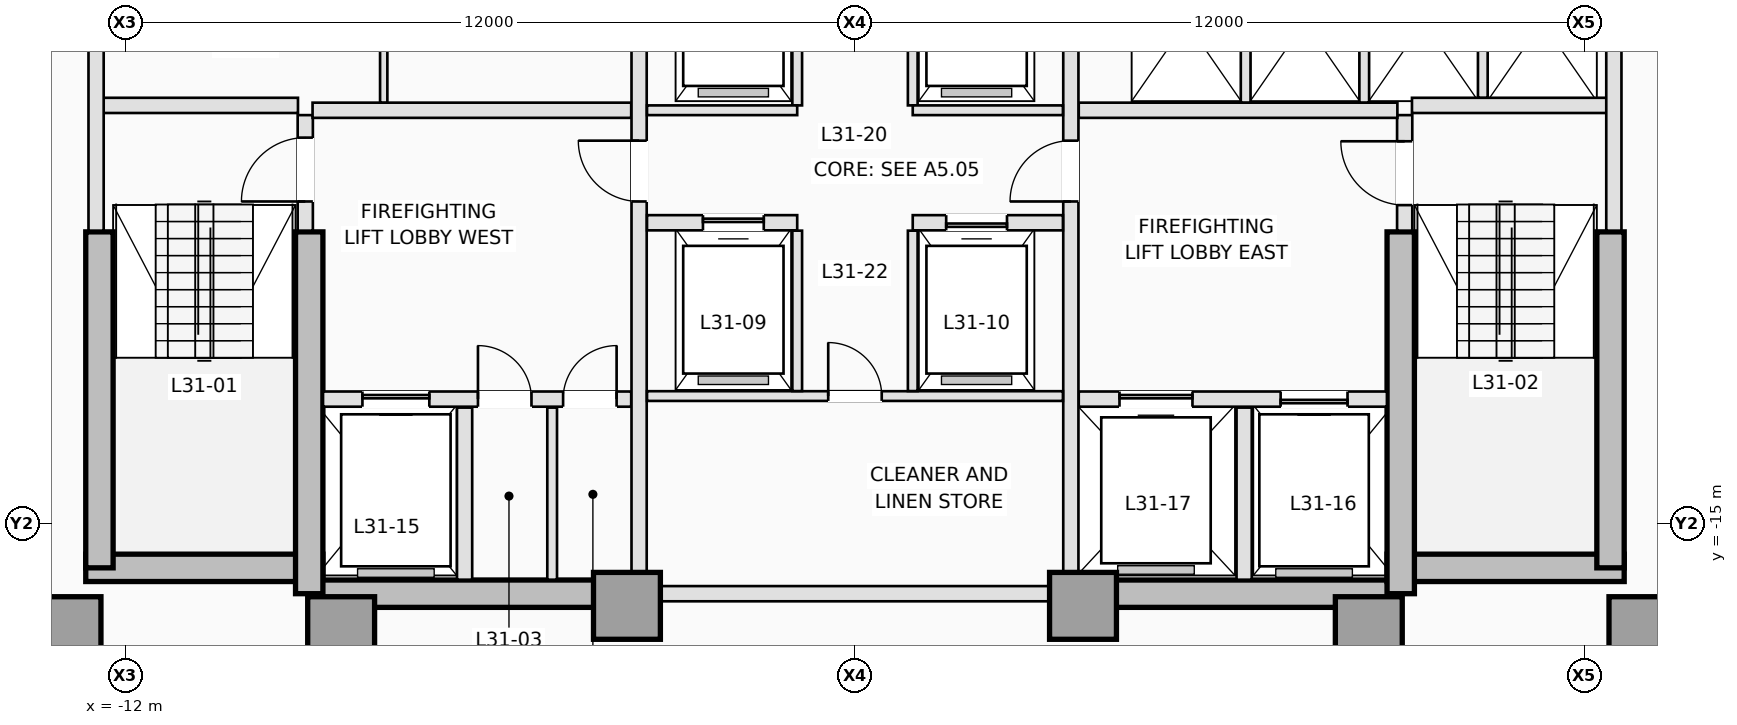
"""IFC4 building model, lengths in metres.
Left out: names, types, materials, properties, quantities, classifications, styles, units other than length and angle.
Written with IfcOpenShell. Run it as: python <this file> out.ifc"""

import sys

from ifc_helpers import new_model, si_unit, direction, frame, frame_2d, origin, origin_2d, place, context, subcontext, project, spatial, rectangle, extrude, element, fill, save


model = new_model("IFC4")
c1 = context("Model", 3, precision=1e-05, world=origin(), true_north=direction((0.0, 1.0)))
c2 = subcontext(c1, "Body", "Model", "MODEL_VIEW")
j1 = project(units=[si_unit("LENGTHUNIT", "METRE"), si_unit("PLANEANGLEUNIT", "RADIAN")], contexts=[c1])
p1 = place(None, origin())
s1 = spatial("IfcSite", under=j1, at=p1, CompositionType="ELEMENT")
p2 = place(p1, origin())
s2 = spatial("IfcBuilding", under=s1, at=p2, CompositionType="ELEMENT")
p3 = place(p2, frame((0.0, 0.0, 116.0)))
s3 = spatial("IfcBuildingStorey", under=s2, at=p3, CompositionType="ELEMENT", Elevation=116.0)
p4 = place(p3, frame((-12.65, -15.725, 0.0), z_axis=(0.0, 0.0, 1.0), x_axis=(1.0, 0.0, 0.0)))
e1 = element("IfcWall", 1, at=p4, inside=s3, PredefinedType="SHEAR", context=c2, shape_type="SweptSolid", body=[
    extrude(rectangle(XDim=3.9, YDim=0.45, at=frame_2d((1.95, 0.0))), origin(), (0.0, 0.0, 1.0), 3.5),
])
for number, where, z_axis, x_axis in (
    (2, (-8.975, -16.15, 0.0), (0.0, 0.0, 1.0), (1.0, 0.0, 0.0)),
    (3, (3.75, -16.15, 0.0), (0.0, 0.0, 1.0), (1.0, 0.0, 0.0)),
):
    element("IfcWall", number, at=place(p3, frame(where, z_axis=z_axis, x_axis=x_axis)), inside=s3, PredefinedType="SHEAR", context=c2, shape_type="SweptSolid", body=[
        extrude(rectangle(XDim=5.225, YDim=0.45, at=frame_2d((2.613, 0.0))), origin(), (0.0, 0.0, 1.0), 3.5),
    ])
p5 = place(p3, frame((8.75, -15.725, 0.0), z_axis=(0.0, 0.0, 1.0), x_axis=(1.0, 0.0, 0.0)))
e4 = element("IfcWall", 4, at=p5, inside=s3, PredefinedType="SHEAR", context=c2, shape_type="SweptSolid", body=[
    extrude(rectangle(XDim=3.9, YDim=0.45, at=frame_2d((1.95, 0.0))), origin(), (0.0, 0.0, 1.0), 3.5),
])
for number, where, z_axis, x_axis in (
    (5, (-12.425, -15.725, 0.0), (0.0, 0.0, 1.0), (0.0, 1.0, 0.0)),
    (6, (12.425, -15.725, 0.0), (0.0, 0.0, 1.0), (0.0, 1.0, 0.0)),
):
    element("IfcWall", number, at=place(p3, frame(where, z_axis=z_axis, x_axis=x_axis)), inside=s3, PredefinedType="SHEAR", context=c2, shape_type="SweptSolid", body=[
        extrude(rectangle(XDim=5.525, YDim=0.45, at=frame_2d((2.763, 0.0))), origin(), (0.0, 0.0, 1.0), 3.5),
    ])
for number, where, z_axis, x_axis in (
    (7, (-8.975, -16.15, 0.0), (0.0, 0.0, 1.0), (0.0, 1.0, 0.0)),
    (8, (8.975, -16.15, 0.0), (0.0, 0.0, 1.0), (0.0, 1.0, 0.0)),
):
    element("IfcWall", number, at=place(p3, frame(where, z_axis=z_axis, x_axis=x_axis)), inside=s3, PredefinedType="SHEAR", context=c2, shape_type="SweptSolid", body=[
        extrude(rectangle(XDim=5.95, YDim=0.45, at=frame_2d((2.975, 0.0))), origin(), (0.0, 0.0, 1.0), 3.5),
    ])
for number, where, z_axis, x_axis in (
    (9, (-12.95, -16.75, 0.0), (0.0, 0.0, 1.0), (1.0, 0.0, 0.0)),
    (10, (-8.45, -16.75, 0.0), (0.0, 0.0, 1.0), (1.0, 0.0, 0.0)),
    (11, (-3.75, -16.35, 0.0), (0.0, 0.0, 1.0), (1.0, 0.0, 0.0)),
    (12, (3.75, -16.35, 0.0), (0.0, 0.0, 1.0), (1.0, 0.0, 0.0)),
    (13, (8.45, -16.75, 0.0), (0.0, 0.0, 1.0), (1.0, 0.0, 0.0)),
    (14, (12.95, -16.75, 0.0), (0.0, 0.0, 1.0), (1.0, 0.0, 0.0)),
):
    element("IfcColumn", number, at=place(p3, frame(where, z_axis=z_axis, x_axis=x_axis)), inside=s3, PredefinedType="COLUMN", context=c2, shape_type="SweptSolid", body=[
        extrude(rectangle(XDim=1.1, YDim=1.1, at=origin_2d()), origin(), (0.0, 0.0, 1.0), 3.5),
    ])
p6 = place(p3, frame((-9.04, -10.18, 0.0), z_axis=(0.0, 0.0, 1.0), x_axis=(0.0, 1.0, 0.0)))
e15 = element("IfcWall", 15, at=p6, inside=s3, PredefinedType="PARTITIONING", context=c2, shape_type="SweptSolid", body=[
    extrude(rectangle(XDim=1.9, YDim=0.25, at=frame_2d((0.95, 0.0))), origin(), (0.0, 0.0, 1.0), 3.25),
])
p7 = place(p6, frame((0.48, 0.0, 0.0)))
e16 = element("IfcOpeningElement", 16, at=p7, cuts=e15, PredefinedType="OPENING", context=c2, shape_type="SweptSolid", body=[
    extrude(rectangle(XDim=1.05, YDim=2.15, at=frame_2d((0.525, 1.075))), frame((0.0, 0.135, 0.0), z_axis=(0.0, -1.0, 0.0), x_axis=(1.0, 0.0, 0.0)), (0.0, 0.0, 1.0), 0.27),
])
p8 = place(p3, frame((9.04, -10.18, 0.0), z_axis=(0.0, 0.0, 1.0), x_axis=(0.0, 1.0, 0.0)))
e17 = element("IfcWall", 17, at=p8, inside=s3, PredefinedType="PARTITIONING", context=c2, shape_type="SweptSolid", body=[
    extrude(rectangle(XDim=1.9, YDim=0.25, at=frame_2d((0.95, 0.0))), origin(), (0.0, 0.0, 1.0), 3.25),
])
p9 = place(p8, frame((0.42, 0.0, 0.0)))
e18 = element("IfcOpeningElement", 18, at=p9, cuts=e17, PredefinedType="OPENING", context=c2, shape_type="SweptSolid", body=[
    extrude(rectangle(XDim=1.05, YDim=2.15, at=frame_2d((0.525, 1.075))), frame((0.0, 0.135, 0.0), z_axis=(0.0, -1.0, 0.0), x_axis=(1.0, 0.0, 0.0)), (0.0, 0.0, 1.0), 0.27),
])
for number, where, z_axis, x_axis in (
    (19, (-12.38, -8.12, 0.0), (0.0, 0.0, 1.0), (1.0, 0.0, 0.0)),
    (20, (9.16, -8.12, 0.0), (0.0, 0.0, 1.0), (1.0, 0.0, 0.0)),
):
    element("IfcWall", number, at=place(p3, frame(where, z_axis=z_axis, x_axis=x_axis)), inside=s3, PredefinedType="PARTITIONING", context=c2, shape_type="SweptSolid", body=[
        extrude(rectangle(XDim=3.22, YDim=0.25, at=frame_2d((1.61, 0.0))), origin(), (0.0, 0.0, 1.0), 3.25),
    ])
for number, where, z_axis, x_axis in (
    (21, (-12.48, -10.18, 0.0), (0.0, 0.0, 1.0), (0.0, 1.0, 0.0)),
    (22, (12.48, -10.18, 0.0), (0.0, 0.0, 1.0), (0.0, 1.0, 0.0)),
):
    element("IfcWall", number, at=place(p3, frame(where, z_axis=z_axis, x_axis=x_axis)), inside=s3, PredefinedType="PARTITIONING", context=c2, shape_type="SweptSolid", body=[
        extrude(rectangle(XDim=4.828, YDim=0.25, at=frame_2d((2.414, 0.0))), origin(), (0.0, 0.0, 1.0), 3.25),
    ])
p10 = place(p3, frame((-8.748, -12.95, 0.0), z_axis=(0.0, 0.0, 1.0), x_axis=(1.0, 0.0, 0.0)))
e23 = element("IfcWall", 23, at=p10, inside=s3, PredefinedType="PARTITIONING", context=c2, shape_type="SweptSolid", body=[
    extrude(rectangle(XDim=5.068, YDim=0.25, at=frame_2d((2.534, 0.0))), origin(), (0.0, 0.0, 1.0), 3.25),
])
p11 = place(p10, frame((0.648, 0.0, 0.0)))
e24 = element("IfcOpeningElement", 24, at=p11, cuts=e23, PredefinedType="OPENING", context=c2, shape_type="SweptSolid", body=[
    extrude(rectangle(XDim=1.1, YDim=2.15, at=frame_2d((0.55, 1.075))), frame((0.0, 0.135, 0.0), z_axis=(0.0, -1.0, 0.0), x_axis=(1.0, 0.0, 0.0)), (0.0, 0.0, 1.0), 0.27),
])
p12 = place(p10, frame((2.548, 0.0, 0.0)))
e25 = element("IfcOpeningElement", 25, at=p12, cuts=e23, PredefinedType="OPENING", context=c2, shape_type="SweptSolid", body=[
    extrude(rectangle(XDim=0.88, YDim=2.1, at=frame_2d((0.44, 1.05))), frame((0.0, 0.135, 0.0), z_axis=(0.0, -1.0, 0.0), x_axis=(1.0, 0.0, 0.0)), (0.0, 0.0, 1.0), 0.27),
])
p13 = place(p10, frame((3.948, 0.0, 0.0)))
e26 = element("IfcOpeningElement", 26, at=p13, cuts=e23, PredefinedType="OPENING", context=c2, shape_type="SweptSolid", body=[
    extrude(rectangle(XDim=0.88, YDim=2.1, at=frame_2d((0.44, 1.05))), frame((0.0, 0.135, 0.0), z_axis=(0.0, -1.0, 0.0), x_axis=(1.0, 0.0, 0.0)), (0.0, 0.0, 1.0), 0.27),
])
p14 = place(p3, frame((3.68, -12.95, 0.0), z_axis=(0.0, 0.0, 1.0), x_axis=(1.0, 0.0, 0.0)))
e27 = element("IfcWall", 27, at=p14, inside=s3, PredefinedType="PARTITIONING", context=c2, shape_type="SweptSolid", body=[
    extrude(rectangle(XDim=5.068, YDim=0.25, at=frame_2d((2.534, 0.0))), origin(), (0.0, 0.0, 1.0), 3.25),
])
p15 = place(p14, frame((3.32, 0.0, 0.0)))
e28 = element("IfcOpeningElement", 28, at=p15, cuts=e27, PredefinedType="OPENING", context=c2, shape_type="SweptSolid", body=[
    extrude(rectangle(XDim=1.1, YDim=2.15, at=frame_2d((0.55, 1.075))), frame((0.0, 0.135, 0.0), z_axis=(0.0, -1.0, 0.0), x_axis=(1.0, 0.0, 0.0)), (0.0, 0.0, 1.0), 0.27),
])
p16 = place(p14, frame((0.67, 0.0, 0.0)))
e29 = element("IfcOpeningElement", 29, at=p16, cuts=e27, PredefinedType="OPENING", context=c2, shape_type="SweptSolid", body=[
    extrude(rectangle(XDim=1.2, YDim=2.15, at=frame_2d((0.6, 1.075))), frame((0.0, 0.135, 0.0), z_axis=(0.0, -1.0, 0.0), x_axis=(1.0, 0.0, 0.0)), (0.0, 0.0, 1.0), 0.27),
])
p17 = place(p3, frame((-6.42, -15.92, 0.0), z_axis=(0.0, 0.0, 1.0), x_axis=(0.0, 1.0, 0.0)))
e30 = element("IfcWall", 30, at=p17, inside=s3, PredefinedType="PARTITIONING", context=c2, shape_type="SweptSolid", body=[
    extrude(rectangle(XDim=2.83, YDim=0.25, at=frame_2d((1.415, 0.0))), origin(), (0.0, 0.0, 1.0), 3.25),
])
p18 = place(p3, frame((-4.98, -15.92, 0.0), z_axis=(0.0, 0.0, 1.0), x_axis=(0.0, 1.0, 0.0)))
e31 = element("IfcWall", 31, at=p18, inside=s3, PredefinedType="PARTITIONING", context=c2, shape_type="SweptSolid", body=[
    extrude(rectangle(XDim=2.83, YDim=0.16, at=frame_2d((1.415, 0.0))), origin(), (0.0, 0.0, 1.0), 3.25),
])
p19 = place(p3, frame((6.4, -15.92, 0.0), z_axis=(0.0, 0.0, 1.0), x_axis=(0.0, 1.0, 0.0)))
e32 = element("IfcWall", 32, at=p19, inside=s3, PredefinedType="PARTITIONING", context=c2, shape_type="SweptSolid", body=[
    extrude(rectangle(XDim=2.83, YDim=0.25, at=frame_2d((1.415, 0.0))), origin(), (0.0, 0.0, 1.0), 3.25),
])
for number, where, z_axis, x_axis in (
    (33, (-8.92, -8.2, 0.0), (0.0, 0.0, 1.0), (1.0, 0.0, 0.0)),
    (34, (3.68, -8.2, 0.0), (0.0, 0.0, 1.0), (1.0, 0.0, 0.0)),
):
    element("IfcWall", number, at=place(p3, frame(where, z_axis=z_axis, x_axis=x_axis)), inside=s3, PredefinedType="PARTITIONING", context=c2, shape_type="SweptSolid", body=[
        extrude(rectangle(XDim=5.24, YDim=0.25, at=frame_2d((2.62, 0.0))), origin(), (0.0, 0.0, 1.0), 3.25),
    ])
p20 = place(p3, frame((-3.55, -15.798, 0.0), z_axis=(0.0, 0.0, 1.0), x_axis=(0.0, 1.0, 0.0)))
e35 = element("IfcWall", 35, at=p20, inside=s3, PredefinedType="PARTITIONING", context=c2, shape_type="SweptSolid", body=[
    extrude(rectangle(XDim=10.446, YDim=0.25, at=frame_2d((5.223, 0.0))), origin(), (0.0, 0.0, 1.0), 3.25),
])
p21 = place(p20, frame((6.098, 0.0, 0.0)))
e36 = element("IfcOpeningElement", 36, at=p21, cuts=e35, PredefinedType="OPENING", context=c2, shape_type="SweptSolid", body=[
    extrude(rectangle(XDim=1.0, YDim=2.15, at=frame_2d((0.5, 1.075))), frame((0.0, 0.135, 0.0), z_axis=(0.0, -1.0, 0.0), x_axis=(1.0, 0.0, 0.0)), (0.0, 0.0, 1.0), 0.27),
])
p22 = place(p3, frame((3.55, -15.798, 0.0), z_axis=(0.0, 0.0, 1.0), x_axis=(0.0, 1.0, 0.0)))
e37 = element("IfcWall", 37, at=p22, inside=s3, PredefinedType="PARTITIONING", context=c2, shape_type="SweptSolid", body=[
    extrude(rectangle(XDim=10.446, YDim=0.25, at=frame_2d((5.223, 0.0))), origin(), (0.0, 0.0, 1.0), 3.25),
])
p23 = place(p22, frame((6.098, 0.0, 0.0)))
e38 = element("IfcOpeningElement", 38, at=p23, cuts=e37, PredefinedType="OPENING", context=c2, shape_type="SweptSolid", body=[
    extrude(rectangle(XDim=1.0, YDim=2.15, at=frame_2d((0.5, 1.075))), frame((0.0, 0.135, 0.0), z_axis=(0.0, -1.0, 0.0), x_axis=(1.0, 0.0, 0.0)), (0.0, 0.0, 1.0), 0.27),
])
p24 = place(p3, frame((-7.75, -8.073, 0.0), z_axis=(0.0, 0.0, 1.0), x_axis=(0.0, 1.0, 0.0)))
e39 = element("IfcWall", 39, at=p24, inside=s3, PredefinedType="PARTITIONING", context=c2, shape_type="SweptSolid", body=[
    extrude(rectangle(XDim=2.733, YDim=0.12, at=frame_2d((1.366, 0.0))), origin(), (0.0, 0.0, 1.0), 3.25),
])
for number, where, z_axis, x_axis in (
    (40, (6.425, -8.073, 0.0), (0.0, 0.0, 1.0), (0.0, 1.0, 0.0)),
    (41, (8.375, -8.073, 0.0), (0.0, 0.0, 1.0), (0.0, 1.0, 0.0)),
):
    element("IfcWall", number, at=place(p3, frame(where, z_axis=z_axis, x_axis=x_axis)), inside=s3, PredefinedType="PARTITIONING", context=c2, shape_type="SweptSolid", body=[
        extrude(rectangle(XDim=2.733, YDim=0.16, at=frame_2d((1.366, 0.0))), origin(), (0.0, 0.0, 1.0), 3.25),
    ])
p25 = place(p3, frame((10.325, -7.993, 0.0), z_axis=(0.0, 0.0, 1.0), x_axis=(0.0, 1.0, 0.0)))
e42 = element("IfcWall", 42, at=p25, inside=s3, PredefinedType="PARTITIONING", context=c2, shape_type="SweptSolid", body=[
    extrude(rectangle(XDim=2.653, YDim=0.16, at=frame_2d((1.326, 0.0))), origin(), (0.0, 0.0, 1.0), 3.25),
])
p26 = place(p3, frame((-3.198, -16.15, 0.0), z_axis=(0.0, 0.0, 1.0), x_axis=(1.0, 0.0, 0.0)))
e43 = element("IfcWall", 43, at=p26, inside=s3, PredefinedType="PARTITIONING", context=c2, shape_type="SweptSolid", body=[
    extrude(rectangle(XDim=6.396, YDim=0.25, at=frame_2d((3.198, 0.0))), origin(), (0.0, 0.0, 1.0), 2.3),
])
for number, where, z_axis, x_axis in (
    (44, (-0.95, -8.12, 0.0), (0.0, 0.0, 1.0), (0.0, 1.0, 0.0)),
    (45, (0.95, -8.12, 0.0), (0.0, 0.0, 1.0), (0.0, 1.0, 0.0)),
):
    element("IfcWall", number, at=place(p3, frame(where, z_axis=z_axis, x_axis=x_axis)), inside=s3, PredefinedType="PARTITIONING", context=c2, shape_type="SweptSolid", body=[
        extrude(rectangle(XDim=2.78, YDim=0.16, at=frame_2d((1.39, 0.0))), origin(), (0.0, 0.0, 1.0), 3.25),
    ])
for number, where, z_axis, x_axis in (
    (46, (-3.42, -8.2, 0.0), (0.0, 0.0, 1.0), (1.0, 0.0, 0.0)),
    (47, (0.95, -8.2, 0.0), (0.0, 0.0, 1.0), (1.0, 0.0, 0.0)),
):
    element("IfcWall", number, at=place(p3, frame(where, z_axis=z_axis, x_axis=x_axis)), inside=s3, PredefinedType="PARTITIONING", context=c2, shape_type="SweptSolid", body=[
        extrude(rectangle(XDim=2.47, YDim=0.16, at=frame_2d((1.235, 0.0))), origin(), (0.0, 0.0, 1.0), 3.25),
    ])
p27 = place(p3, frame((-3.42, -10.05, 0.0), z_axis=(0.0, 0.0, 1.0), x_axis=(1.0, 0.0, 0.0)))
e48 = element("IfcWall", 48, at=p27, inside=s3, PredefinedType="PARTITIONING", context=c2, shape_type="SweptSolid", body=[
    extrude(rectangle(XDim=2.47, YDim=0.25, at=frame_2d((1.235, 0.0))), origin(), (0.0, 0.0, 1.0), 3.25),
])
p28 = place(p27, frame((0.92, 0.0, 0.0)))
e49 = element("IfcOpeningElement", 49, at=p28, cuts=e48, PredefinedType="OPENING", context=c2, shape_type="SweptSolid", body=[
    extrude(rectangle(XDim=1.0, YDim=2.15, at=frame_2d((0.5, 1.075))), frame((0.0, 0.135, 0.0), z_axis=(0.0, -1.0, 0.0), x_axis=(1.0, 0.0, 0.0)), (0.0, 0.0, 1.0), 0.27),
])
p29 = place(p3, frame((0.95, -10.05, 0.0), z_axis=(0.0, 0.0, 1.0), x_axis=(1.0, 0.0, 0.0)))
e50 = element("IfcWall", 50, at=p29, inside=s3, PredefinedType="PARTITIONING", context=c2, shape_type="SweptSolid", body=[
    extrude(rectangle(XDim=2.47, YDim=0.25, at=frame_2d((1.235, 0.0))), origin(), (0.0, 0.0, 1.0), 3.25),
])
p30 = place(p29, frame((0.55, 0.0, 0.0)))
e51 = element("IfcOpeningElement", 51, at=p30, cuts=e50, PredefinedType="OPENING", context=c2, shape_type="SweptSolid", body=[
    extrude(rectangle(XDim=1.0, YDim=2.15, at=frame_2d((0.5, 1.075))), frame((0.0, 0.135, 0.0), z_axis=(0.0, -1.0, 0.0), x_axis=(1.0, 0.0, 0.0)), (0.0, 0.0, 1.0), 0.27),
])
p31 = place(p3, frame((-3.42, -12.9, 0.0), z_axis=(0.0, 0.0, 1.0), x_axis=(1.0, 0.0, 0.0)))
e52 = element("IfcWall", 52, at=p31, inside=s3, PredefinedType="PARTITIONING", context=c2, shape_type="SweptSolid", body=[
    extrude(rectangle(XDim=6.84, YDim=0.16, at=frame_2d((3.42, 0.0))), origin(), (0.0, 0.0, 1.0), 3.25),
])
p32 = place(p31, frame((2.98, 0.0, 0.0)))
e53 = element("IfcOpeningElement", 53, at=p32, cuts=e52, PredefinedType="OPENING", context=c2, shape_type="SweptSolid", body=[
    extrude(rectangle(XDim=0.88, YDim=2.12, at=frame_2d((0.44, 1.06))), frame((0.0, 0.09, 0.0), z_axis=(0.0, -1.0, 0.0), x_axis=(1.0, 0.0, 0.0)), (0.0, 0.0, 1.0), 0.18),
])
for number, where, z_axis, x_axis in (
    (54, (-0.95, -12.818, 0.0), (0.0, 0.0, 1.0), (0.0, 1.0, 0.0)),
    (55, (0.95, -12.818, 0.0), (0.0, 0.0, 1.0), (0.0, 1.0, 0.0)),
):
    element("IfcWall", number, at=place(p3, frame(where, z_axis=z_axis, x_axis=x_axis)), inside=s3, PredefinedType="PARTITIONING", context=c2, shape_type="SweptSolid", body=[
        extrude(rectangle(XDim=2.638, YDim=0.16, at=frame_2d((1.319, 0.0))), origin(), (0.0, 0.0, 1.0), 3.25),
    ])
p33 = place(p11, origin())
e56 = element("IfcDoor", 56, at=p33, inside=s3, OperationType="SLIDING_TO_LEFT", PredefinedType="DOOR", context=c2, shape_type="SweptSolid", body=[
    extrude(rectangle(XDim=1.1, YDim=2.15, at=frame_2d((0.55, 1.075))), frame((0.0, 0.025, 0.0), z_axis=(0.0, -1.0, 0.0), x_axis=(1.0, 0.0, 0.0)), (0.0, 0.0, 1.0), 0.05),
])
fill(e24, e56)
p34 = place(p15, origin())
e57 = element("IfcDoor", 57, at=p34, inside=s3, OperationType="SLIDING_TO_RIGHT", PredefinedType="DOOR", context=c2, shape_type="SweptSolid", body=[
    extrude(rectangle(XDim=1.1, YDim=2.15, at=frame_2d((0.55, 1.075))), frame((0.0, 0.025, 0.0), z_axis=(0.0, -1.0, 0.0), x_axis=(1.0, 0.0, 0.0)), (0.0, 0.0, 1.0), 0.05),
])
fill(e28, e57)
p35 = place(p16, origin())
e58 = element("IfcDoor", 58, at=p35, inside=s3, OperationType="SLIDING_TO_LEFT", PredefinedType="DOOR", context=c2, shape_type="SweptSolid", body=[
    extrude(rectangle(XDim=1.2, YDim=2.15, at=frame_2d((0.6, 1.075))), frame((0.0, 0.025, 0.0), z_axis=(0.0, -1.0, 0.0), x_axis=(1.0, 0.0, 0.0)), (0.0, 0.0, 1.0), 0.05),
])
fill(e29, e58)
p36 = place(p28, origin())
e59 = element("IfcDoor", 59, at=p36, inside=s3, OperationType="SLIDING_TO_LEFT", PredefinedType="DOOR", context=c2, shape_type="SweptSolid", body=[
    extrude(rectangle(XDim=1.0, YDim=2.15, at=frame_2d((0.5, 1.075))), frame((0.0, 0.025, 0.0), z_axis=(0.0, -1.0, 0.0), x_axis=(1.0, 0.0, 0.0)), (0.0, 0.0, 1.0), 0.05),
])
fill(e49, e59)
p37 = place(p30, origin())
e60 = element("IfcDoor", 60, at=p37, inside=s3, OperationType="SLIDING_TO_RIGHT", PredefinedType="DOOR", context=c2, shape_type="SweptSolid", body=[
    extrude(rectangle(XDim=1.0, YDim=2.15, at=frame_2d((0.5, 1.075))), frame((0.0, 0.025, 0.0), z_axis=(0.0, -1.0, 0.0), x_axis=(1.0, 0.0, 0.0)), (0.0, 0.0, 1.0), 0.05),
])
fill(e51, e60)
p38 = place(p7, origin())
e61 = element("IfcDoor", 61, at=p38, inside=s3, OperationType="SINGLE_SWING_LEFT", PredefinedType="DOOR", context=c2, shape_type="SweptSolid", body=[
    extrude(rectangle(XDim=1.05, YDim=2.15, at=frame_2d((0.525, 1.075))), frame((0.0, 0.025, 0.0), z_axis=(0.0, -1.0, 0.0), x_axis=(1.0, 0.0, 0.0)), (0.0, 0.0, 1.0), 0.05),
])
fill(e16, e61)
p39 = place(p9, origin())
e62 = element("IfcDoor", 62, at=p39, inside=s3, OperationType="SINGLE_SWING_RIGHT", PredefinedType="DOOR", context=c2, shape_type="SweptSolid", body=[
    extrude(rectangle(XDim=1.05, YDim=2.15, at=frame_2d((0.525, 1.075))), frame((0.0, 0.025, 0.0), z_axis=(0.0, -1.0, 0.0), x_axis=(1.0, 0.0, 0.0)), (0.0, 0.0, 1.0), 0.05),
])
fill(e18, e62)
p40 = place(p12, origin())
e63 = element("IfcDoor", 63, at=p40, inside=s3, OperationType="SINGLE_SWING_LEFT", PredefinedType="TRAPDOOR", context=c2, shape_type="SweptSolid", body=[
    extrude(rectangle(XDim=0.88, YDim=2.1, at=frame_2d((0.44, 1.05))), frame((0.0, 0.025, 0.0), z_axis=(0.0, -1.0, 0.0), x_axis=(1.0, 0.0, 0.0)), (0.0, 0.0, 1.0), 0.05),
])
fill(e25, e63)
p41 = place(p13, origin())
e64 = element("IfcDoor", 64, at=p41, inside=s3, OperationType="SINGLE_SWING_RIGHT", PredefinedType="TRAPDOOR", context=c2, shape_type="SweptSolid", body=[
    extrude(rectangle(XDim=0.88, YDim=2.1, at=frame_2d((0.44, 1.05))), frame((0.0, 0.025, 0.0), z_axis=(0.0, -1.0, 0.0), x_axis=(1.0, 0.0, 0.0)), (0.0, 0.0, 1.0), 0.05),
])
fill(e26, e64)
p42 = place(p21, origin())
e65 = element("IfcDoor", 65, at=p42, inside=s3, OperationType="SINGLE_SWING_RIGHT", PredefinedType="DOOR", context=c2, shape_type="SweptSolid", body=[
    extrude(rectangle(XDim=1.0, YDim=2.15, at=frame_2d((0.5, 1.075))), frame((0.0, 0.025, 0.0), z_axis=(0.0, -1.0, 0.0), x_axis=(1.0, 0.0, 0.0)), (0.0, 0.0, 1.0), 0.05),
])
fill(e36, e65)
p43 = place(p23, origin())
e66 = element("IfcDoor", 66, at=p43, inside=s3, OperationType="SINGLE_SWING_LEFT", PredefinedType="DOOR", context=c2, shape_type="SweptSolid", body=[
    extrude(rectangle(XDim=1.0, YDim=2.15, at=frame_2d((0.5, 1.075))), frame((0.0, 0.025, 0.0), z_axis=(0.0, -1.0, 0.0), x_axis=(1.0, 0.0, 0.0)), (0.0, 0.0, 1.0), 0.05),
])
fill(e38, e66)
p44 = place(p32, origin())
e67 = element("IfcDoor", 67, at=p44, inside=s3, OperationType="SINGLE_SWING_LEFT", PredefinedType="DOOR", context=c2, shape_type="SweptSolid", body=[
    extrude(rectangle(XDim=0.88, YDim=2.12, at=frame_2d((0.44, 1.06))), frame((0.0, 0.025, 0.0), z_axis=(0.0, -1.0, 0.0), x_axis=(1.0, 0.0, 0.0)), (0.0, 0.0, 1.0), 0.05),
])
fill(e53, e67)
save(model, sys.argv[1])
